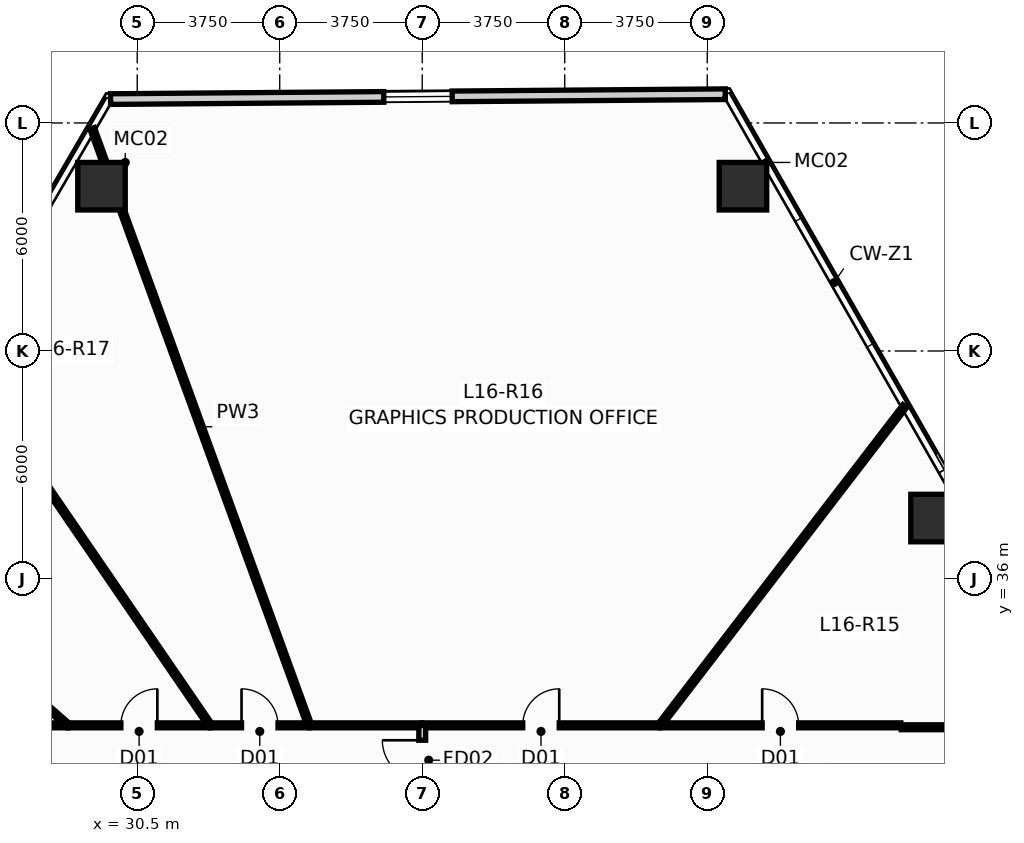
"""IFC4 building model, lengths in metres.
Left out: names, types, materials, properties, quantities, classifications, styles, units other than length and angle.
Written with IfcOpenShell. Run it as: python <this file> out.ifc"""

import sys

from ifc_helpers import new_model, si_unit, direction, frame, frame_2d, origin, origin_2d, place, context, subcontext, project, spatial, rectangle, hollow_rectangle, extrude, source, transform, mapped, element, fill, save


model = new_model("IFC4")
c1 = context("Model", 3, precision=1e-05, world=origin(), true_north=direction((0.0, 1.0)))
c2 = subcontext(c1, "Body", "Model", "MODEL_VIEW")
j1 = project(units=[si_unit("LENGTHUNIT", "METRE"), si_unit("PLANEANGLEUNIT", "RADIAN")], contexts=[c1])
p1 = place(None, origin())
s1 = spatial("IfcSite", under=j1, at=p1, CompositionType="ELEMENT")
p2 = place(p1, origin())
s2 = spatial("IfcBuilding", under=s1, at=p2, CompositionType="ELEMENT")
p3 = place(p2, frame((0.0, 0.0, 64.1)))
s3 = spatial("IfcBuildingStorey", under=s2, at=p3, CompositionType="ELEMENT", Elevation=64.1)
m1 = source(origin(), c2, "Body", "SweptSolid", [
    extrude(hollow_rectangle(XDim=1.25, YDim=1.25, WallThickness=0.07, at=origin_2d()), origin(), (0.0, 0.0, 1.0), 3.651),
])
for number, where, z_axis, x_axis in (
    (1, (46.44, 46.336, 0.0), (-0.024, 0.002, 1.0), (-0.075, -0.997, 0.0)),
    (2, (29.56, 46.336, 0.0), (0.024, 0.002, 1.0), (-0.075, 0.997, 0.0)),
):
    element("IfcColumn", number, at=place(p3, frame(where, z_axis=z_axis, x_axis=x_axis)), inside=s3, PredefinedType="COLUMN", context=c2, shape_type="MappedRepresentation", body=[
        mapped(m1, transform((0.0, 0.0, 0.0), scale=1.0)),
    ])
m2 = source(origin(), c2, "Body", "SweptSolid", [
    extrude(hollow_rectangle(XDim=1.25, YDim=1.25, WallThickness=0.07, at=origin_2d()), origin(), (0.0, 0.0, 1.0), 3.651),
])
p4 = place(p3, frame((51.481, 37.604, 0.0), z_axis=(-0.019393993486, -0.006018825565, 0.999793802119), x_axis=(0.296399214872, -0.955064136811, 0.0)))
e3 = element("IfcColumn", 3, at=p4, inside=s3, PredefinedType="COLUMN", context=c2, shape_type="MappedRepresentation", body=[
    mapped(m2, transform((0.0, 0.0, 0.0), scale=1.0)),
])
p5 = place(p3, frame((29.798, 48.628, 0.0), z_axis=(0.0, 0.0, 1.0), x_axis=(0.999968373243, 0.007953144877, 0.0)))
e4 = element("IfcWall", 4, at=p5, inside=s3, PredefinedType="STANDARD", context=c2, shape_type="SweptSolid", body=[
    extrude(rectangle(XDim=16.177, YDim=0.28, at=frame_2d((8.089, 0.0))), origin(), (0.0, 0.0, 1.0), 3.4),
])
p6 = place(p5, frame((7.19, 0.0, 0.9)))
e5 = element("IfcOpeningElement", 5, at=p6, cuts=e4, PredefinedType="OPENING", context=c2, shape_type="SweptSolid", body=[
    extrude(rectangle(XDim=1.8, YDim=1.8, at=frame_2d((0.9, 0.9))), frame((0.0, 0.152, 0.0), z_axis=(0.0, -1.0, 0.0), x_axis=(1.0, 0.0, 0.0)), (0.0, 0.0, 1.0), 0.304),
])
p7 = place(p3, frame((29.314, 47.858, 0.0), z_axis=(0.0, 0.0, 1.0), x_axis=(0.341930745852, -0.93972515399, 0.0)))
e6 = element("IfcWall", 6, at=p7, inside=s3, PredefinedType="PARTITIONING", context=c2, shape_type="SweptSolid", body=[
    extrude(rectangle(XDim=16.711, YDim=0.13, at=frame_2d((8.355, 0.0))), origin(), (0.0, 0.0, 1.0), 2.783),
])
p8 = place(p3, frame((25.798, 41.815, 0.0), z_axis=(0.0, 0.0, 1.0), x_axis=(0.565186777451, -0.824962972863, 0.0)))
e7 = element("IfcWall", 7, at=p8, inside=s3, PredefinedType="PARTITIONING", context=c2, shape_type="SweptSolid", body=[
    extrude(rectangle(XDim=11.711, YDim=0.13, at=frame_2d((5.855, 0.0))), origin(), (0.0, 0.0, 1.0), 3.4),
])
p9 = place(p3, frame((44.253, 32.154, 0.0), z_axis=(0.0, 0.0, 1.0), x_axis=(0.608962576695, 0.793198953722, 0.0)))
e8 = element("IfcWall", 8, at=p9, inside=s3, PredefinedType="PARTITIONING", context=c2, shape_type="SweptSolid", body=[
    extrude(rectangle(XDim=10.585, YDim=0.13, at=frame_2d((5.292, 0.0))), origin(), (0.0, 0.0, 1.0), 3.4),
])
p10 = place(p3, frame((23.045, 37.084, 0.0), z_axis=(0.0, 0.0, 1.0), x_axis=(0.752303838626, -0.658816313087, 0.0)))
e9 = element("IfcWall", 9, at=p10, inside=s3, PredefinedType="PARTITIONING", context=c2, shape_type="SweptSolid", body=[
    extrude(rectangle(XDim=7.484, YDim=0.13, at=frame_2d((3.742, 0.0))), origin(), (0.0, 0.0, 1.0), 2.783),
])
p11 = place(p3, frame((44.255, 32.15, 0.0), z_axis=(0.0, 0.0, 1.0), x_axis=(1.0, 0.0, 0.0)))
e10 = element("IfcWall", 10, at=p11, inside=s3, PredefinedType="PARTITIONING", context=c2, shape_type="SweptSolid", body=[
    extrude(rectangle(XDim=6.34, YDim=0.13, at=frame_2d((3.17, 0.0))), origin(), (0.0, 0.0, 1.0), 3.4),
])
p12 = place(p11, frame((2.69, 0.0, 0.0)))
e11 = element("IfcOpeningElement", 11, at=p12, cuts=e10, PredefinedType="OPENING", context=c2, shape_type="SweptSolid", body=[
    extrude(rectangle(XDim=0.96, YDim=2.15, at=frame_2d((0.48, 1.075))), frame((0.0, 0.077, 0.0), z_axis=(0.0, -1.0, 0.0), x_axis=(1.0, 0.0, 0.0)), (0.0, 0.0, 1.0), 0.154),
])
p13 = place(p3, frame((38.005, 32.15, 0.0), z_axis=(0.0, 0.0, 1.0), x_axis=(1.0, 0.0, 0.0)))
e12 = element("IfcWall", 12, at=p13, inside=s3, PredefinedType="PARTITIONING", context=c2, shape_type="SweptSolid", body=[
    extrude(rectangle(XDim=6.24, YDim=0.13, at=frame_2d((3.12, 0.0))), origin(), (0.0, 0.0, 1.0), 3.4),
])
p14 = place(p13, frame((2.64, 0.0, 0.0)))
e13 = element("IfcOpeningElement", 13, at=p14, cuts=e12, PredefinedType="OPENING", context=c2, shape_type="SweptSolid", body=[
    extrude(rectangle(XDim=0.96, YDim=2.15, at=frame_2d((0.48, 1.075))), frame((0.0, 0.077, 0.0), z_axis=(0.0, -1.0, 0.0), x_axis=(1.0, 0.0, 0.0)), (0.0, 0.0, 1.0), 0.154),
])
p15 = place(p3, frame((50.605, 32.1, 0.0), z_axis=(0.0, 0.0, 1.0), x_axis=(1.0, 0.0, 0.0)))
e14 = element("IfcWall", 14, at=p15, inside=s3, PredefinedType="PARTITIONING", context=c2, shape_type="SweptSolid", body=[
    extrude(rectangle(XDim=4.921, YDim=0.13, at=frame_2d((2.46, 0.0))), origin(), (0.0, 0.0, 1.0), 3.4),
])
p16 = place(p3, frame((28.685, 32.15, 0.0), z_axis=(0.0, 0.0, 1.0), x_axis=(1.0, 0.0, 0.0)))
e15 = element("IfcWall", 15, at=p16, inside=s3, PredefinedType="PARTITIONING", context=c2, shape_type="SweptSolid", body=[
    extrude(rectangle(XDim=3.73, YDim=0.13, at=frame_2d((1.865, 0.0))), origin(), (0.0, 0.0, 1.0), 3.4),
])
p17 = place(p16, frame((1.385, 0.0, 0.0)))
e16 = element("IfcOpeningElement", 16, at=p17, cuts=e15, PredefinedType="OPENING", context=c2, shape_type="SweptSolid", body=[
    extrude(rectangle(XDim=0.96, YDim=2.15, at=frame_2d((0.48, 1.075))), frame((0.0, 0.077, 0.0), z_axis=(0.0, -1.0, 0.0), x_axis=(1.0, 0.0, 0.0)), (0.0, 0.0, 1.0), 0.154),
])
p18 = place(p3, frame((25.405, 32.15, 0.0), z_axis=(0.0, 0.0, 1.0), x_axis=(1.0, 0.0, 0.0)))
e17 = element("IfcWall", 17, at=p18, inside=s3, PredefinedType="PARTITIONING", context=c2, shape_type="SweptSolid", body=[
    extrude(rectangle(XDim=3.27, YDim=0.13, at=frame_2d((1.635, 0.0))), origin(), (0.0, 0.0, 1.0), 3.4),
])
p19 = place(p3, frame((35.035, 32.15, 0.0), z_axis=(0.0, 0.0, 1.0), x_axis=(1.0, 0.0, 0.0)))
e18 = element("IfcWall", 18, at=p19, inside=s3, PredefinedType="PARTITIONING", context=c2, shape_type="SweptSolid", body=[
    extrude(rectangle(XDim=2.96, YDim=0.13, at=frame_2d((1.48, 0.0))), origin(), (0.0, 0.0, 1.0), 3.4),
])
p20 = place(p3, frame((32.425, 32.15, 0.0), z_axis=(0.0, 0.0, 1.0), x_axis=(1.0, 0.0, 0.0)))
e19 = element("IfcWall", 19, at=p20, inside=s3, PredefinedType="PARTITIONING", context=c2, shape_type="SweptSolid", body=[
    extrude(rectangle(XDim=2.6, YDim=0.13, at=frame_2d((1.3, 0.0))), origin(), (0.0, 0.0, 1.0), 3.4),
])
p21 = place(p20, frame((0.82, 0.0, 0.0)))
e20 = element("IfcOpeningElement", 20, at=p21, cuts=e19, PredefinedType="OPENING", context=c2, shape_type="SweptSolid", body=[
    extrude(rectangle(XDim=0.96, YDim=2.15, at=frame_2d((0.48, 1.075))), frame((0.0, 0.077, 0.0), z_axis=(0.0, -1.0, 0.0), x_axis=(1.0, 0.0, 0.0)), (0.0, 0.0, 1.0), 0.154),
])
p22 = place(p3, frame((38.0, 30.32, 0.0), z_axis=(0.0, 0.0, 1.0), x_axis=(0.0, 1.0, 0.0)))
e21 = element("IfcWall", 21, at=p22, inside=s3, PredefinedType="PARTITIONING", context=c2, shape_type="SweptSolid", body=[
    extrude(rectangle(XDim=1.825, YDim=0.18, at=frame_2d((0.913, 0.0))), origin(), (0.0, 0.0, 1.0), 3.4),
])
p23 = place(p22, frame((0.388, 0.0, 0.0)))
e22 = element("IfcOpeningElement", 22, at=p23, cuts=e21, PredefinedType="OPENING", context=c2, shape_type="SweptSolid", body=[
    extrude(rectangle(XDim=1.05, YDim=2.15, at=frame_2d((0.525, 1.075))), frame((0.0, 0.102, 0.0), z_axis=(0.0, -1.0, 0.0), x_axis=(1.0, 0.0, 0.0)), (0.0, 0.0, 1.0), 0.204),
])
p24 = place(p6, origin())
e23 = element("IfcWindow", 23, at=p24, inside=s3, PartitioningType="SINGLE_PANEL", PredefinedType="WINDOW", context=c2, shape_type="SweptSolid", body=[
    extrude(rectangle(XDim=1.8, YDim=1.8, at=frame_2d((0.9, 0.9))), frame((0.0, 0.03, 0.0), z_axis=(0.0, -1.0, 0.0), x_axis=(1.0, 0.0, 0.0)), (0.0, 0.0, 1.0), 0.06),
])
fill(e5, e23)
p25 = place(p12, origin())
e24 = element("IfcDoor", 24, at=p25, inside=s3, OperationType="SINGLE_SWING_LEFT", PredefinedType="DOOR", context=c2, shape_type="SweptSolid", body=[
    extrude(rectangle(XDim=0.96, YDim=2.15, at=frame_2d((0.48, 1.075))), frame((0.0, 0.025, 0.0), z_axis=(0.0, -1.0, 0.0), x_axis=(1.0, 0.0, 0.0)), (0.0, 0.0, 1.0), 0.05),
])
fill(e11, e24)
p26 = place(p14, origin())
e25 = element("IfcDoor", 25, at=p26, inside=s3, OperationType="SINGLE_SWING_RIGHT", PredefinedType="DOOR", context=c2, shape_type="SweptSolid", body=[
    extrude(rectangle(XDim=0.96, YDim=2.15, at=frame_2d((0.48, 1.075))), frame((0.0, 0.025, 0.0), z_axis=(0.0, -1.0, 0.0), x_axis=(1.0, 0.0, 0.0)), (0.0, 0.0, 1.0), 0.05),
])
fill(e13, e25)
p27 = place(p17, origin())
e26 = element("IfcDoor", 26, at=p27, inside=s3, OperationType="SINGLE_SWING_RIGHT", PredefinedType="DOOR", context=c2, shape_type="SweptSolid", body=[
    extrude(rectangle(XDim=0.96, YDim=2.15, at=frame_2d((0.48, 1.075))), frame((0.0, 0.025, 0.0), z_axis=(0.0, -1.0, 0.0), x_axis=(1.0, 0.0, 0.0)), (0.0, 0.0, 1.0), 0.05),
])
fill(e16, e26)
p28 = place(p21, origin())
e27 = element("IfcDoor", 27, at=p28, inside=s3, OperationType="SINGLE_SWING_LEFT", PredefinedType="DOOR", context=c2, shape_type="SweptSolid", body=[
    extrude(rectangle(XDim=0.96, YDim=2.15, at=frame_2d((0.48, 1.075))), frame((0.0, 0.025, 0.0), z_axis=(0.0, -1.0, 0.0), x_axis=(1.0, 0.0, 0.0)), (0.0, 0.0, 1.0), 0.05),
])
fill(e20, e27)
p29 = place(p23, origin())
e28 = element("IfcDoor", 28, at=p29, inside=s3, OperationType="SINGLE_SWING_RIGHT", PredefinedType="DOOR", context=c2, shape_type="SweptSolid", body=[
    extrude(rectangle(XDim=1.05, YDim=2.15, at=frame_2d((0.525, 1.075))), frame((0.0, 0.025, 0.0), z_axis=(0.0, -1.0, 0.0), x_axis=(1.0, 0.0, 0.0)), (0.0, 0.0, 1.0), 0.05),
])
fill(e22, e28)
save(model, sys.argv[1])
